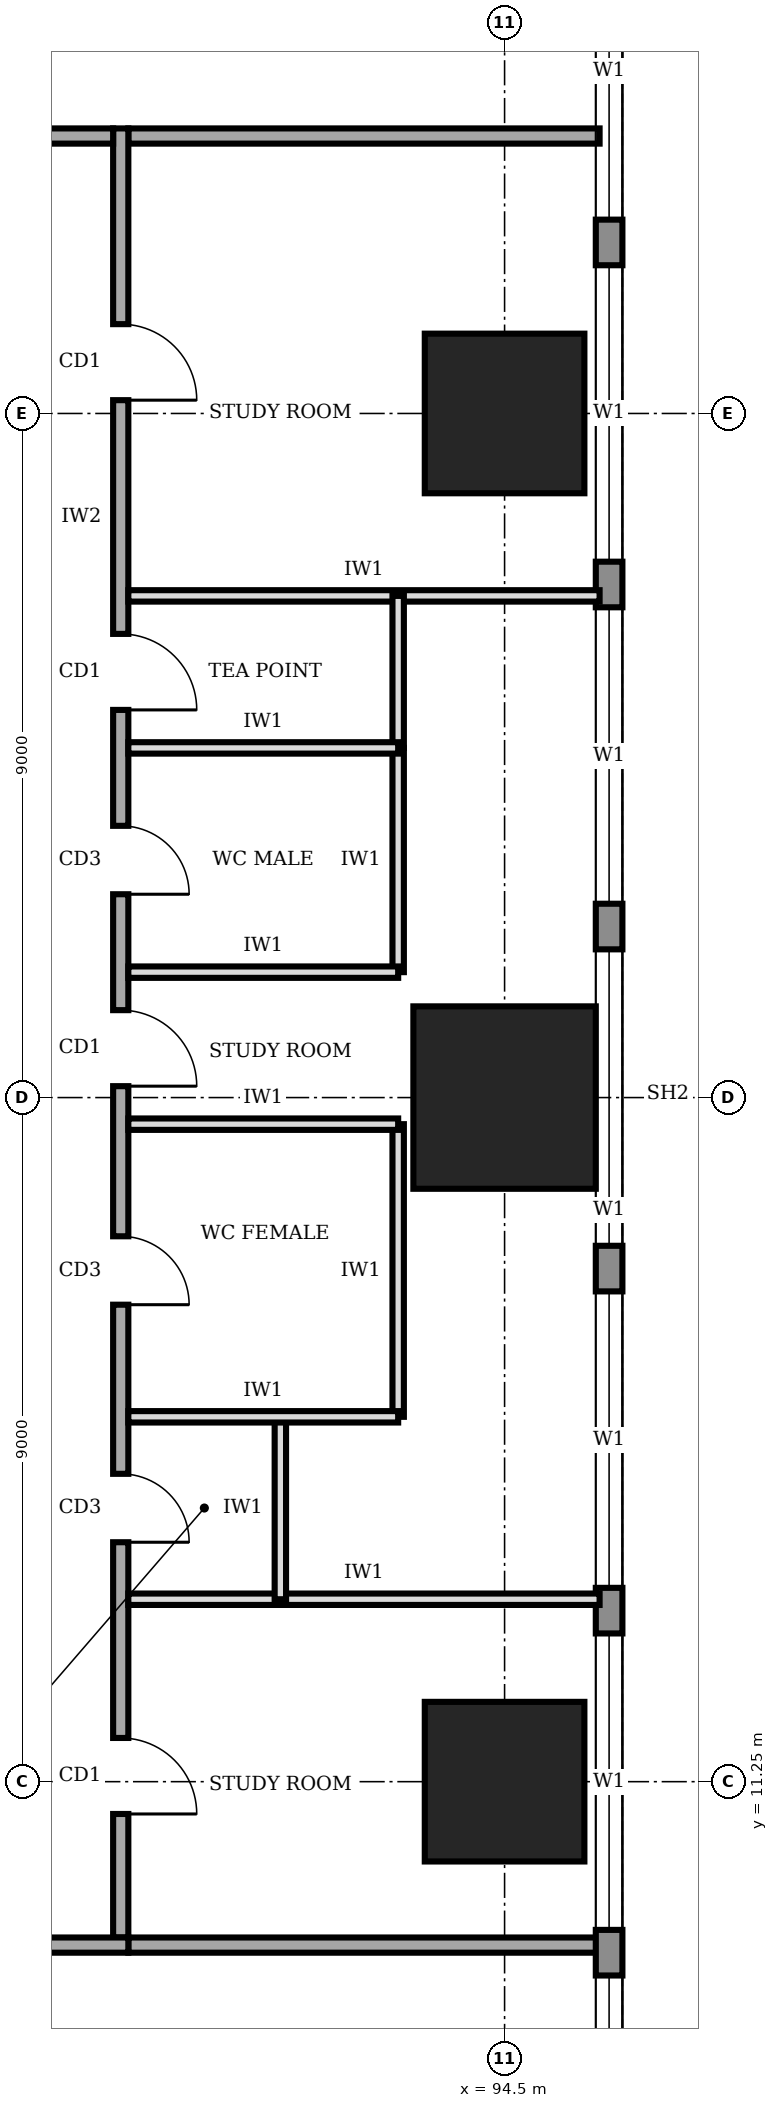
"""IFC4 building model, lengths in metres.
Left out: names, types, materials, properties, quantities, classifications, styles, units other than length and angle.
Written with IfcOpenShell. Run it as: python <this file> out.ifc"""

import sys

from ifc_helpers import new_model, si_unit, direction, frame, frame_2d, origin, origin_2d, place, context, subcontext, project, spatial, rectangle, extrude, element, fill, save


model = new_model("IFC4")
c1 = context("Model", 3, precision=1e-05, world=origin(), true_north=direction((0.0, 1.0)))
c2 = subcontext(c1, "Body", "Model", "MODEL_VIEW")
j1 = project(units=[si_unit("LENGTHUNIT", "METRE"), si_unit("PLANEANGLEUNIT", "RADIAN")], contexts=[c1])
p1 = place(None, origin())
s1 = spatial("IfcSite", under=j1, at=p1, CompositionType="ELEMENT")
p2 = place(p1, origin())
s2 = spatial("IfcBuilding", under=s1, at=p2, CompositionType="ELEMENT")
p3 = place(p2, frame((0.0, 0.0, 105.0)))
s3 = spatial("IfcBuildingStorey", under=s2, at=p3, CompositionType="ELEMENT", Elevation=105.0)
p4 = place(p3, frame((94.5, 11.25, 0.0), z_axis=(0.0, 0.0, 1.0), x_axis=(1.0, 0.0, 0.0)))
e1 = element("IfcColumn", 1, at=p4, inside=s3, PredefinedType="COLUMN", context=c2, shape_type="SweptSolid", body=[
    extrude(rectangle(XDim=2.1, YDim=2.1, at=origin_2d()), origin(), (0.0, 0.0, 1.0), 4.0),
])
p5 = place(p3, frame((94.5, 20.25, 0.0), z_axis=(0.0, 0.0, 1.0), x_axis=(1.0, 0.0, 0.0)))
e2 = element("IfcColumn", 2, at=p5, inside=s3, PredefinedType="COLUMN", context=c2, shape_type="SweptSolid", body=[
    extrude(rectangle(XDim=2.4, YDim=2.4, at=origin_2d()), origin(), (0.0, 0.0, 1.0), 4.0),
])
p6 = place(p3, frame((94.5, 29.25, 0.0), z_axis=(0.0, 0.0, 1.0), x_axis=(1.0, 0.0, 0.0)))
e3 = element("IfcColumn", 3, at=p6, inside=s3, PredefinedType="COLUMN", context=c2, shape_type="SweptSolid", body=[
    extrude(rectangle(XDim=2.1, YDim=2.1, at=origin_2d()), origin(), (0.0, 0.0, 1.0), 4.0),
])
p7 = place(p3, frame((95.875, 3.32, 0.0), z_axis=(0.0, 0.0, 1.0), x_axis=(0.0, 1.0, 0.0)))
e4 = element("IfcWall", 4, at=p7, inside=s3, PredefinedType="STANDARD", context=c2, shape_type="SweptSolid", body=[
    extrude(rectangle(XDim=33.96, YDim=0.35, at=frame_2d((16.98, 0.0))), origin(), (0.0, 0.0, 1.0), 3.75),
])
p8 = place(p7, frame((1.48, 0.0, 0.9)))
e5 = element("IfcOpeningElement", 5, at=p8, cuts=e4, PredefinedType="OPENING", context=c2, shape_type="SweptSolid", body=[
    extrude(rectangle(XDim=3.9, YDim=2.2, at=frame_2d((1.95, 1.1))), frame((0.0, 0.185, 0.0), z_axis=(0.0, -1.0, 0.0), x_axis=(1.0, 0.0, 0.0)), (0.0, 0.0, 1.0), 0.37),
])
p9 = place(p7, frame((5.98, 0.0, 0.9)))
e6 = element("IfcOpeningElement", 6, at=p9, cuts=e4, PredefinedType="OPENING", context=c2, shape_type="SweptSolid", body=[
    extrude(rectangle(XDim=3.9, YDim=2.2, at=frame_2d((1.95, 1.1))), frame((0.0, 0.185, 0.0), z_axis=(0.0, -1.0, 0.0), x_axis=(1.0, 0.0, 0.0)), (0.0, 0.0, 1.0), 0.37),
])
p10 = place(p7, frame((10.48, 0.0, 0.9)))
e7 = element("IfcOpeningElement", 7, at=p10, cuts=e4, PredefinedType="OPENING", context=c2, shape_type="SweptSolid", body=[
    extrude(rectangle(XDim=3.9, YDim=2.2, at=frame_2d((1.95, 1.1))), frame((0.0, 0.185, 0.0), z_axis=(0.0, -1.0, 0.0), x_axis=(1.0, 0.0, 0.0)), (0.0, 0.0, 1.0), 0.37),
])
p11 = place(p7, frame((14.98, 0.0, 0.9)))
e8 = element("IfcOpeningElement", 8, at=p11, cuts=e4, PredefinedType="OPENING", context=c2, shape_type="SweptSolid", body=[
    extrude(rectangle(XDim=3.9, YDim=2.2, at=frame_2d((1.95, 1.1))), frame((0.0, 0.185, 0.0), z_axis=(0.0, -1.0, 0.0), x_axis=(1.0, 0.0, 0.0)), (0.0, 0.0, 1.0), 0.37),
])
p12 = place(p7, frame((19.48, 0.0, 0.9)))
e9 = element("IfcOpeningElement", 9, at=p12, cuts=e4, PredefinedType="OPENING", context=c2, shape_type="SweptSolid", body=[
    extrude(rectangle(XDim=3.9, YDim=2.2, at=frame_2d((1.95, 1.1))), frame((0.0, 0.185, 0.0), z_axis=(0.0, -1.0, 0.0), x_axis=(1.0, 0.0, 0.0)), (0.0, 0.0, 1.0), 0.37),
])
p13 = place(p7, frame((23.98, 0.0, 0.9)))
e10 = element("IfcOpeningElement", 10, at=p13, cuts=e4, PredefinedType="OPENING", context=c2, shape_type="SweptSolid", body=[
    extrude(rectangle(XDim=3.9, YDim=2.2, at=frame_2d((1.95, 1.1))), frame((0.0, 0.185, 0.0), z_axis=(0.0, -1.0, 0.0), x_axis=(1.0, 0.0, 0.0)), (0.0, 0.0, 1.0), 0.37),
])
p14 = place(p7, frame((28.48, 0.0, 0.9)))
e11 = element("IfcOpeningElement", 11, at=p14, cuts=e4, PredefinedType="OPENING", context=c2, shape_type="SweptSolid", body=[
    extrude(rectangle(XDim=3.9, YDim=2.2, at=frame_2d((1.95, 1.1))), frame((0.0, 0.185, 0.0), z_axis=(0.0, -1.0, 0.0), x_axis=(1.0, 0.0, 0.0)), (0.0, 0.0, 1.0), 0.37),
])
p15 = place(p3, frame((72.65, 9.1, 0.0), z_axis=(0.0, 0.0, 1.0), x_axis=(1.0, 0.0, 0.0)))
e12 = element("IfcWall", 12, at=p15, inside=s3, PredefinedType="SOLIDWALL", context=c2, shape_type="SweptSolid", body=[
    extrude(rectangle(XDim=16.9, YDim=0.2, at=frame_2d((8.45, 0.0))), origin(), (0.0, 0.0, 1.0), 3.75),
])
p16 = place(p15, frame((1.325, 0.0, 0.0)))
e13 = element("IfcOpeningElement", 13, at=p16, cuts=e12, PredefinedType="OPENING", context=c2, shape_type="SweptSolid", body=[
    extrude(rectangle(XDim=1.0, YDim=2.1, at=frame_2d((0.5, 1.05))), frame((0.0, 0.11, 0.0), z_axis=(0.0, -1.0, 0.0), x_axis=(1.0, 0.0, 0.0)), (0.0, 0.0, 1.0), 0.22),
])
p17 = place(p15, frame((7.85, 0.0, 0.0)))
e14 = element("IfcOpeningElement", 14, at=p17, cuts=e12, PredefinedType="OPENING", context=c2, shape_type="SweptSolid", body=[
    extrude(rectangle(XDim=1.0, YDim=2.1, at=frame_2d((0.5, 1.05))), frame((0.0, 0.11, 0.0), z_axis=(0.0, -1.0, 0.0), x_axis=(1.0, 0.0, 0.0)), (0.0, 0.0, 1.0), 0.22),
])
p18 = place(p15, frame((14.375, 0.0, 0.0)))
e15 = element("IfcOpeningElement", 15, at=p18, cuts=e12, PredefinedType="OPENING", context=c2, shape_type="SweptSolid", body=[
    extrude(rectangle(XDim=1.0, YDim=2.1, at=frame_2d((0.5, 1.05))), frame((0.0, 0.11, 0.0), z_axis=(0.0, -1.0, 0.0), x_axis=(1.0, 0.0, 0.0)), (0.0, 0.0, 1.0), 0.22),
])
p19 = place(p3, frame((89.45, 9.2, 0.0), z_axis=(0.0, 0.0, 1.0), x_axis=(0.0, 1.0, 0.0)))
e16 = element("IfcWall", 16, at=p19, inside=s3, PredefinedType="SOLIDWALL", context=c2, shape_type="SweptSolid", body=[
    extrude(rectangle(XDim=23.8, YDim=0.2, at=frame_2d((11.9, 0.0))), origin(), (0.0, 0.0, 1.0), 3.75),
])
p20 = place(p19, frame((1.625, 0.0, 0.0)))
e17 = element("IfcOpeningElement", 17, at=p20, cuts=e16, PredefinedType="OPENING", context=c2, shape_type="SweptSolid", body=[
    extrude(rectangle(XDim=1.0, YDim=2.1, at=frame_2d((0.5, 1.05))), frame((0.0, 0.11, 0.0), z_axis=(0.0, -1.0, 0.0), x_axis=(1.0, 0.0, 0.0)), (0.0, 0.0, 1.0), 0.22),
])
p21 = place(p19, frame((5.2, 0.0, 0.0)))
e18 = element("IfcOpeningElement", 18, at=p21, cuts=e16, PredefinedType="OPENING", context=c2, shape_type="SweptSolid", body=[
    extrude(rectangle(XDim=0.9, YDim=2.1, at=frame_2d((0.45, 1.05))), frame((0.0, 0.11, 0.0), z_axis=(0.0, -1.0, 0.0), x_axis=(1.0, 0.0, 0.0)), (0.0, 0.0, 1.0), 0.22),
])
p22 = place(p19, frame((8.325, 0.0, 0.0)))
e19 = element("IfcOpeningElement", 19, at=p22, cuts=e16, PredefinedType="OPENING", context=c2, shape_type="SweptSolid", body=[
    extrude(rectangle(XDim=0.9, YDim=2.1, at=frame_2d((0.45, 1.05))), frame((0.0, 0.11, 0.0), z_axis=(0.0, -1.0, 0.0), x_axis=(1.0, 0.0, 0.0)), (0.0, 0.0, 1.0), 0.22),
])
p23 = place(p19, frame((13.725, 0.0, 0.0)))
e20 = element("IfcOpeningElement", 20, at=p23, cuts=e16, PredefinedType="OPENING", context=c2, shape_type="SweptSolid", body=[
    extrude(rectangle(XDim=0.9, YDim=2.1, at=frame_2d((0.45, 1.05))), frame((0.0, 0.11, 0.0), z_axis=(0.0, -1.0, 0.0), x_axis=(1.0, 0.0, 0.0)), (0.0, 0.0, 1.0), 0.22),
])
p24 = place(p19, frame((16.15, 0.0, 0.0)))
e21 = element("IfcOpeningElement", 21, at=p24, cuts=e16, PredefinedType="OPENING", context=c2, shape_type="SweptSolid", body=[
    extrude(rectangle(XDim=1.0, YDim=2.1, at=frame_2d((0.5, 1.05))), frame((0.0, 0.11, 0.0), z_axis=(0.0, -1.0, 0.0), x_axis=(1.0, 0.0, 0.0)), (0.0, 0.0, 1.0), 0.22),
])
p25 = place(p19, frame((11.2, 0.0, 0.0)))
e22 = element("IfcOpeningElement", 22, at=p25, cuts=e16, PredefinedType="OPENING", context=c2, shape_type="SweptSolid", body=[
    extrude(rectangle(XDim=1.0, YDim=2.1, at=frame_2d((0.5, 1.05))), frame((0.0, 0.11, 0.0), z_axis=(0.0, -1.0, 0.0), x_axis=(1.0, 0.0, 0.0)), (0.0, 0.0, 1.0), 0.22),
])
p26 = place(p19, frame((20.225, 0.0, 0.0)))
e23 = element("IfcOpeningElement", 23, at=p26, cuts=e16, PredefinedType="OPENING", context=c2, shape_type="SweptSolid", body=[
    extrude(rectangle(XDim=1.0, YDim=2.1, at=frame_2d((0.5, 1.05))), frame((0.0, 0.11, 0.0), z_axis=(0.0, -1.0, 0.0), x_axis=(1.0, 0.0, 0.0)), (0.0, 0.0, 1.0), 0.22),
])
p27 = place(p3, frame((89.35, 32.9, 0.0), z_axis=(0.0, 0.0, 1.0), x_axis=(-1.0, 0.0, 0.0)))
e24 = element("IfcWall", 24, at=p27, inside=s3, PredefinedType="SOLIDWALL", context=c2, shape_type="SweptSolid", body=[
    extrude(rectangle(XDim=16.9, YDim=0.2, at=frame_2d((8.45, 0.0))), origin(), (0.0, 0.0, 1.0), 3.75),
])
p28 = place(p27, frame((14.375, 0.0, 0.0)))
e25 = element("IfcOpeningElement", 25, at=p28, cuts=e24, PredefinedType="OPENING", context=c2, shape_type="SweptSolid", body=[
    extrude(rectangle(XDim=1.0, YDim=2.1, at=frame_2d((0.5, 1.05))), frame((0.0, 0.11, 0.0), z_axis=(0.0, -1.0, 0.0), x_axis=(1.0, 0.0, 0.0)), (0.0, 0.0, 1.0), 0.22),
])
p29 = place(p27, frame((7.85, 0.0, 0.0)))
e26 = element("IfcOpeningElement", 26, at=p29, cuts=e24, PredefinedType="OPENING", context=c2, shape_type="SweptSolid", body=[
    extrude(rectangle(XDim=1.0, YDim=2.1, at=frame_2d((0.5, 1.05))), frame((0.0, 0.11, 0.0), z_axis=(0.0, -1.0, 0.0), x_axis=(1.0, 0.0, 0.0)), (0.0, 0.0, 1.0), 0.22),
])
p30 = place(p27, frame((1.325, 0.0, 0.0)))
e27 = element("IfcOpeningElement", 27, at=p30, cuts=e24, PredefinedType="OPENING", context=c2, shape_type="SweptSolid", body=[
    extrude(rectangle(XDim=1.0, YDim=2.1, at=frame_2d((0.5, 1.05))), frame((0.0, 0.11, 0.0), z_axis=(0.0, -1.0, 0.0), x_axis=(1.0, 0.0, 0.0)), (0.0, 0.0, 1.0), 0.22),
])
for number, where, z_axis, x_axis in (
    (28, (89.55, 9.1, 0.0), (0.0, 0.0, 1.0), (1.0, 0.0, 0.0)),
    (29, (89.55, 32.9, 0.0), (0.0, 0.0, 1.0), (1.0, 0.0, 0.0)),
):
    element("IfcWall", number, at=place(p3, frame(where, z_axis=z_axis, x_axis=x_axis)), inside=s3, PredefinedType="SOLIDWALL", context=c2, shape_type="SweptSolid", body=[
        extrude(rectangle(XDim=6.2, YDim=0.2, at=frame_2d((3.1, 0.0))), origin(), (0.0, 0.0, 1.0), 3.75),
    ])
for number, where, z_axis, x_axis in (
    (30, (89.55, 13.65, 0.0), (0.0, 0.0, 1.0), (1.0, 0.0, 0.0)),
    (31, (89.55, 26.85, 0.0), (0.0, 0.0, 1.0), (1.0, 0.0, 0.0)),
):
    element("IfcWall", number, at=place(p3, frame(where, z_axis=z_axis, x_axis=x_axis)), inside=s3, PredefinedType="PARTITIONING", context=c2, shape_type="SweptSolid", body=[
        extrude(rectangle(XDim=6.2, YDim=0.15, at=frame_2d((3.1, 0.0))), origin(), (0.0, 0.0, 1.0), 3.75),
    ])
p31 = place(p3, frame((89.55, 16.05, 0.0), z_axis=(0.0, 0.0, 1.0), x_axis=(1.0, 0.0, 0.0)))
e32 = element("IfcWall", 32, at=p31, inside=s3, PredefinedType="PARTITIONING", context=c2, shape_type="SweptSolid", body=[
    extrude(rectangle(XDim=3.55, YDim=0.15, at=frame_2d((1.775, 0.0))), origin(), (0.0, 0.0, 1.0), 3.75),
])
p32 = place(p3, frame((89.55, 19.9, 0.0), z_axis=(0.0, 0.0, 1.0), x_axis=(1.0, 0.0, 0.0)))
e33 = element("IfcWall", 33, at=p32, inside=s3, PredefinedType="PARTITIONING", context=c2, shape_type="SweptSolid", body=[
    extrude(rectangle(XDim=3.55, YDim=0.15, at=frame_2d((1.775, 0.0))), origin(), (0.0, 0.0, 1.0), 2.85),
])
for number, where, z_axis, x_axis in (
    (34, (89.55, 21.9, 0.0), (0.0, 0.0, 1.0), (1.0, 0.0, 0.0)),
    (35, (89.55, 24.85, 0.0), (0.0, 0.0, 1.0), (1.0, 0.0, 0.0)),
):
    element("IfcWall", number, at=place(p3, frame(where, z_axis=z_axis, x_axis=x_axis)), inside=s3, PredefinedType="PARTITIONING", context=c2, shape_type="SweptSolid", body=[
        extrude(rectangle(XDim=3.55, YDim=0.15, at=frame_2d((1.775, 0.0))), origin(), (0.0, 0.0, 1.0), 3.75),
    ])
p33 = place(p3, frame((91.55, 13.65, 0.0), z_axis=(0.0, 0.0, 1.0), x_axis=(0.0, 1.0, 0.0)))
e36 = element("IfcWall", 36, at=p33, inside=s3, PredefinedType="PARTITIONING", context=c2, shape_type="SweptSolid", body=[
    extrude(rectangle(XDim=2.4, YDim=0.15, at=frame_2d((1.2, 0.0))), origin(), (0.0, 0.0, 1.0), 3.75),
])
p34 = place(p3, frame((93.1, 16.05, 0.0), z_axis=(0.0, 0.0, 1.0), x_axis=(0.0, 1.0, 0.0)))
e37 = element("IfcWall", 37, at=p34, inside=s3, PredefinedType="PARTITIONING", context=c2, shape_type="SweptSolid", body=[
    extrude(rectangle(XDim=3.85, YDim=0.15, at=frame_2d((1.925, 0.0))), origin(), (0.0, 0.0, 1.0), 3.75),
])
p35 = place(p3, frame((93.1, 21.9, 0.0), z_axis=(0.0, 0.0, 1.0), x_axis=(0.0, 1.0, 0.0)))
e38 = element("IfcWall", 38, at=p35, inside=s3, PredefinedType="PARTITIONING", context=c2, shape_type="SweptSolid", body=[
    extrude(rectangle(XDim=2.95, YDim=0.15, at=frame_2d((1.475, 0.0))), origin(), (0.0, 0.0, 1.0), 3.75),
])
p36 = place(p3, frame((93.1, 24.85, 0.0), z_axis=(0.0, 0.0, 1.0), x_axis=(0.0, 1.0, 0.0)))
e39 = element("IfcWall", 39, at=p36, inside=s3, PredefinedType="PARTITIONING", context=c2, shape_type="SweptSolid", body=[
    extrude(rectangle(XDim=2.0, YDim=0.15, at=frame_2d((1.0, 0.0))), origin(), (0.0, 0.0, 1.0), 3.75),
])
p37 = place(p8, origin())
e40 = element("IfcWindow", 40, at=p37, inside=s3, PartitioningType="SINGLE_PANEL", PredefinedType="WINDOW", context=c2, shape_type="SweptSolid", body=[
    extrude(rectangle(XDim=3.9, YDim=2.2, at=frame_2d((1.95, 1.1))), frame((0.0, 0.03, 0.0), z_axis=(0.0, -1.0, 0.0), x_axis=(1.0, 0.0, 0.0)), (0.0, 0.0, 1.0), 0.06),
])
fill(e5, e40)
p38 = place(p9, origin())
e41 = element("IfcWindow", 41, at=p38, inside=s3, PartitioningType="SINGLE_PANEL", PredefinedType="WINDOW", context=c2, shape_type="SweptSolid", body=[
    extrude(rectangle(XDim=3.9, YDim=2.2, at=frame_2d((1.95, 1.1))), frame((0.0, 0.03, 0.0), z_axis=(0.0, -1.0, 0.0), x_axis=(1.0, 0.0, 0.0)), (0.0, 0.0, 1.0), 0.06),
])
fill(e6, e41)
p39 = place(p10, origin())
e42 = element("IfcWindow", 42, at=p39, inside=s3, PartitioningType="SINGLE_PANEL", PredefinedType="WINDOW", context=c2, shape_type="SweptSolid", body=[
    extrude(rectangle(XDim=3.9, YDim=2.2, at=frame_2d((1.95, 1.1))), frame((0.0, 0.03, 0.0), z_axis=(0.0, -1.0, 0.0), x_axis=(1.0, 0.0, 0.0)), (0.0, 0.0, 1.0), 0.06),
])
fill(e7, e42)
p40 = place(p11, origin())
e43 = element("IfcWindow", 43, at=p40, inside=s3, PartitioningType="SINGLE_PANEL", PredefinedType="WINDOW", context=c2, shape_type="SweptSolid", body=[
    extrude(rectangle(XDim=3.9, YDim=2.2, at=frame_2d((1.95, 1.1))), frame((0.0, 0.03, 0.0), z_axis=(0.0, -1.0, 0.0), x_axis=(1.0, 0.0, 0.0)), (0.0, 0.0, 1.0), 0.06),
])
fill(e8, e43)
p41 = place(p12, origin())
e44 = element("IfcWindow", 44, at=p41, inside=s3, PartitioningType="SINGLE_PANEL", PredefinedType="WINDOW", context=c2, shape_type="SweptSolid", body=[
    extrude(rectangle(XDim=3.9, YDim=2.2, at=frame_2d((1.95, 1.1))), frame((0.0, 0.03, 0.0), z_axis=(0.0, -1.0, 0.0), x_axis=(1.0, 0.0, 0.0)), (0.0, 0.0, 1.0), 0.06),
])
fill(e9, e44)
p42 = place(p13, origin())
e45 = element("IfcWindow", 45, at=p42, inside=s3, PartitioningType="SINGLE_PANEL", PredefinedType="WINDOW", context=c2, shape_type="SweptSolid", body=[
    extrude(rectangle(XDim=3.9, YDim=2.2, at=frame_2d((1.95, 1.1))), frame((0.0, 0.03, 0.0), z_axis=(0.0, -1.0, 0.0), x_axis=(1.0, 0.0, 0.0)), (0.0, 0.0, 1.0), 0.06),
])
fill(e10, e45)
p43 = place(p14, origin())
e46 = element("IfcWindow", 46, at=p43, inside=s3, PartitioningType="SINGLE_PANEL", PredefinedType="WINDOW", context=c2, shape_type="SweptSolid", body=[
    extrude(rectangle(XDim=3.9, YDim=2.2, at=frame_2d((1.95, 1.1))), frame((0.0, 0.03, 0.0), z_axis=(0.0, -1.0, 0.0), x_axis=(1.0, 0.0, 0.0)), (0.0, 0.0, 1.0), 0.06),
])
fill(e11, e46)
p44 = place(p20, frame((1.0, 0.0, 0.0), z_axis=(0.0, 0.0, 1.0), x_axis=(-1.0, 0.0, 0.0)))
e47 = element("IfcDoor", 47, at=p44, inside=s3, OperationType="SINGLE_SWING_RIGHT", PredefinedType="DOOR", context=c2, shape_type="SweptSolid", body=[
    extrude(rectangle(XDim=1.0, YDim=2.1, at=frame_2d((0.5, 1.05))), frame((0.0, 0.025, 0.0), z_axis=(0.0, -1.0, 0.0), x_axis=(1.0, 0.0, 0.0)), (0.0, 0.0, 1.0), 0.05),
])
fill(e17, e47)
p45 = place(p21, frame((0.9, 0.0, 0.0), z_axis=(0.0, 0.0, 1.0), x_axis=(-1.0, 0.0, 0.0)))
e48 = element("IfcDoor", 48, at=p45, inside=s3, OperationType="SINGLE_SWING_RIGHT", PredefinedType="DOOR", context=c2, shape_type="SweptSolid", body=[
    extrude(rectangle(XDim=0.9, YDim=2.1, at=frame_2d((0.45, 1.05))), frame((0.0, 0.025, 0.0), z_axis=(0.0, -1.0, 0.0), x_axis=(1.0, 0.0, 0.0)), (0.0, 0.0, 1.0), 0.05),
])
fill(e18, e48)
p46 = place(p22, frame((0.9, 0.0, 0.0), z_axis=(0.0, 0.0, 1.0), x_axis=(-1.0, 0.0, 0.0)))
e49 = element("IfcDoor", 49, at=p46, inside=s3, OperationType="SINGLE_SWING_RIGHT", PredefinedType="DOOR", context=c2, shape_type="SweptSolid", body=[
    extrude(rectangle(XDim=0.9, YDim=2.1, at=frame_2d((0.45, 1.05))), frame((0.0, 0.025, 0.0), z_axis=(0.0, -1.0, 0.0), x_axis=(1.0, 0.0, 0.0)), (0.0, 0.0, 1.0), 0.05),
])
fill(e19, e49)
p47 = place(p23, frame((0.9, 0.0, 0.0), z_axis=(0.0, 0.0, 1.0), x_axis=(-1.0, 0.0, 0.0)))
e50 = element("IfcDoor", 50, at=p47, inside=s3, OperationType="SINGLE_SWING_RIGHT", PredefinedType="DOOR", context=c2, shape_type="SweptSolid", body=[
    extrude(rectangle(XDim=0.9, YDim=2.1, at=frame_2d((0.45, 1.05))), frame((0.0, 0.025, 0.0), z_axis=(0.0, -1.0, 0.0), x_axis=(1.0, 0.0, 0.0)), (0.0, 0.0, 1.0), 0.05),
])
fill(e20, e50)
p48 = place(p24, frame((1.0, 0.0, 0.0), z_axis=(0.0, 0.0, 1.0), x_axis=(-1.0, 0.0, 0.0)))
e51 = element("IfcDoor", 51, at=p48, inside=s3, OperationType="SINGLE_SWING_RIGHT", PredefinedType="DOOR", context=c2, shape_type="SweptSolid", body=[
    extrude(rectangle(XDim=1.0, YDim=2.1, at=frame_2d((0.5, 1.05))), frame((0.0, 0.025, 0.0), z_axis=(0.0, -1.0, 0.0), x_axis=(1.0, 0.0, 0.0)), (0.0, 0.0, 1.0), 0.05),
])
fill(e21, e51)
p49 = place(p25, frame((1.0, 0.0, 0.0), z_axis=(0.0, 0.0, 1.0), x_axis=(-1.0, 0.0, 0.0)))
e52 = element("IfcDoor", 52, at=p49, inside=s3, OperationType="SINGLE_SWING_RIGHT", PredefinedType="DOOR", context=c2, shape_type="SweptSolid", body=[
    extrude(rectangle(XDim=1.0, YDim=2.1, at=frame_2d((0.5, 1.05))), frame((0.0, 0.025, 0.0), z_axis=(0.0, -1.0, 0.0), x_axis=(1.0, 0.0, 0.0)), (0.0, 0.0, 1.0), 0.05),
])
fill(e22, e52)
p50 = place(p26, frame((1.0, 0.0, 0.0), z_axis=(0.0, 0.0, 1.0), x_axis=(-1.0, 0.0, 0.0)))
e53 = element("IfcDoor", 53, at=p50, inside=s3, OperationType="SINGLE_SWING_RIGHT", PredefinedType="DOOR", context=c2, shape_type="SweptSolid", body=[
    extrude(rectangle(XDim=1.0, YDim=2.1, at=frame_2d((0.5, 1.05))), frame((0.0, 0.025, 0.0), z_axis=(0.0, -1.0, 0.0), x_axis=(1.0, 0.0, 0.0)), (0.0, 0.0, 1.0), 0.05),
])
fill(e23, e53)
save(model, sys.argv[1])
